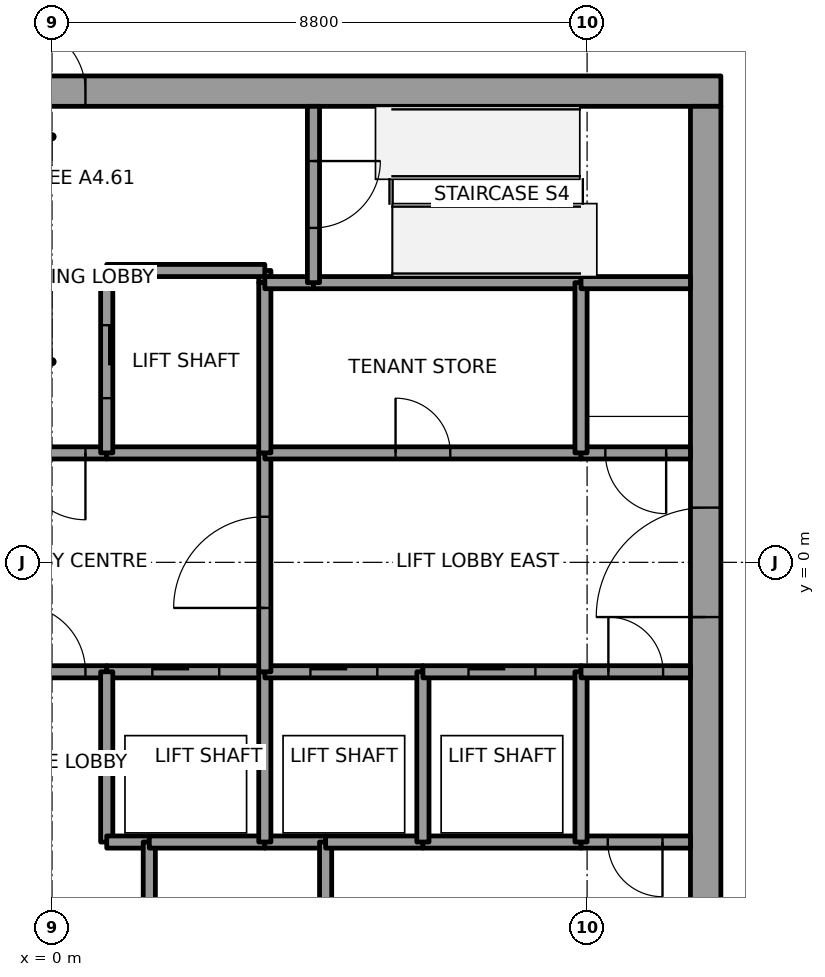
"""IFC4 building model, lengths in metres.
Left out: names, types, materials, properties, quantities, classifications, styles, units other than length and angle.
Written with IfcOpenShell. Run it as: python <this file> out.ifc"""

import sys

from ifc_helpers import new_model, si_unit, direction, frame, frame_2d, origin, place, context, subcontext, project, spatial, rectangle, extrude, element, fill, save


model = new_model("IFC4")
c1 = context("Model", 3, precision=1e-05, world=origin(), true_north=direction((0.0, 1.0)))
c2 = subcontext(c1, "Body", "Model", "MODEL_VIEW")
j1 = project(units=[si_unit("LENGTHUNIT", "METRE"), si_unit("PLANEANGLEUNIT", "RADIAN")], contexts=[c1])
p1 = place(None, origin())
s1 = spatial("IfcSite", under=j1, at=p1, CompositionType="ELEMENT")
p2 = place(p1, origin())
s2 = spatial("IfcBuilding", under=s1, at=p2, CompositionType="ELEMENT")
p3 = place(p2, frame((0.0, 0.0, 263.0)))
s3 = spatial("IfcBuildingStorey", under=s2, at=p3, CompositionType="ELEMENT", Elevation=263.0)
p4 = place(p3, frame((-11.0, 7.75, 0.0), z_axis=(0.0, 0.0, 1.0), x_axis=(1.0, 0.0, 0.0)))
e1 = element("IfcWall", 1, at=p4, inside=s3, PredefinedType="SHEAR", context=c2, shape_type="SweptSolid", body=[
    extrude(rectangle(XDim=22.0, YDim=0.5, at=frame_2d((11.0, 0.0))), origin(), (0.0, 0.0, 1.0), 4.0),
])
p5 = place(p4, frame((10.45, 0.0, 0.0)))
e2 = element("IfcOpeningElement", 2, at=p5, cuts=e1, PredefinedType="OPENING", context=c2, shape_type="SweptSolid", body=[
    extrude(rectangle(XDim=1.1, YDim=2.1, at=frame_2d((0.55, 1.05))), frame((0.0, 0.25, 0.0), z_axis=(0.0, -1.0, 0.0), x_axis=(1.0, 0.0, 0.0)), (0.0, 0.0, 1.0), 0.5),
])
p6 = place(p3, frame((10.75, -7.5, 0.0), z_axis=(0.0, 0.0, 1.0), x_axis=(0.0, 1.0, 0.0)))
e3 = element("IfcWall", 3, at=p6, inside=s3, PredefinedType="SHEAR", context=c2, shape_type="SweptSolid", body=[
    extrude(rectangle(XDim=15.0, YDim=0.5, at=frame_2d((7.5, 0.0))), origin(), (0.0, 0.0, 1.0), 4.0),
])
p7 = place(p6, frame((6.6, 0.0, 0.0)))
e4 = element("IfcOpeningElement", 4, at=p7, cuts=e3, PredefinedType="OPENING", context=c2, shape_type="SweptSolid", body=[
    extrude(rectangle(XDim=1.8, YDim=2.1, at=frame_2d((0.9, 1.05))), frame((0.0, 0.25, 0.0), z_axis=(0.0, -1.0, 0.0), x_axis=(1.0, 0.0, 0.0)), (0.0, 0.0, 1.0), 0.5),
])
p8 = place(p3, frame((-0.9, -1.8, 0.0), z_axis=(0.0, 0.0, 1.0), x_axis=(1.0, 0.0, 0.0)))
e5 = element("IfcWall", 5, at=p8, inside=s3, PredefinedType="SOLIDWALL", context=c2, shape_type="SweptSolid", body=[
    extrude(rectangle(XDim=1.8, YDim=0.2, at=frame_2d((0.9, 0.0))), origin(), (0.0, 0.0, 1.0), 3.85),
])
p9 = place(p8, frame((0.35, 0.0, 0.0)))
e6 = element("IfcOpeningElement", 6, at=p9, cuts=e5, PredefinedType="OPENING", context=c2, shape_type="SweptSolid", body=[
    extrude(rectangle(XDim=1.1, YDim=2.1, at=frame_2d((0.55, 1.05))), frame((0.0, 0.1, 0.0), z_axis=(0.0, -1.0, 0.0), x_axis=(1.0, 0.0, 0.0)), (0.0, 0.0, 1.0), 0.2),
])
p10 = place(p3, frame((0.9, 1.8, 0.0), z_axis=(0.0, 0.0, 1.0), x_axis=(-1.0, 0.0, 0.0)))
e7 = element("IfcWall", 7, at=p10, inside=s3, PredefinedType="SOLIDWALL", context=c2, shape_type="SweptSolid", body=[
    extrude(rectangle(XDim=1.8, YDim=0.2, at=frame_2d((0.9, 0.0))), origin(), (0.0, 0.0, 1.0), 3.85),
])
p11 = place(p10, frame((0.35, 0.0, 0.0)))
e8 = element("IfcOpeningElement", 8, at=p11, cuts=e7, PredefinedType="OPENING", context=c2, shape_type="SweptSolid", body=[
    extrude(rectangle(XDim=1.1, YDim=2.1, at=frame_2d((0.55, 1.05))), frame((0.0, 0.1, 0.0), z_axis=(0.0, -1.0, 0.0), x_axis=(1.0, 0.0, 0.0)), (0.0, 0.0, 1.0), 0.2),
])
p12 = place(p3, frame((0.9, -1.8, 0.0), z_axis=(0.0, 0.0, 1.0), x_axis=(1.0, 0.0, 0.0)))
e9 = element("IfcWall", 9, at=p12, inside=s3, PredefinedType="SOLIDWALL", context=c2, shape_type="SweptSolid", body=[
    extrude(rectangle(XDim=2.6, YDim=0.2, at=frame_2d((1.3, 0.0))), origin(), (0.0, 0.0, 1.0), 3.85),
])
p13 = place(p12, frame((0.75, 0.0, 0.0)))
e10 = element("IfcOpeningElement", 10, at=p13, cuts=e9, PredefinedType="OPENING", context=c2, shape_type="SweptSolid", body=[
    extrude(rectangle(XDim=1.1, YDim=2.1, at=frame_2d((0.55, 1.05))), frame((0.0, 0.1, 0.0), z_axis=(0.0, -1.0, 0.0), x_axis=(1.0, 0.0, 0.0)), (0.0, 0.0, 1.0), 0.2),
])
p14 = place(p3, frame((0.9, -1.8, 0.0), z_axis=(0.0, 0.0, 1.0), x_axis=(0.0, -1.0, 0.0)))
e11 = element("IfcWall", 11, at=p14, inside=s3, PredefinedType="SOLIDWALL", context=c2, shape_type="SweptSolid", body=[
    extrude(rectangle(XDim=2.8, YDim=0.2, at=frame_2d((1.4, 0.0))), origin(), (0.0, 0.0, 1.0), 3.85),
])
p15 = place(p3, frame((0.9, -4.6, 0.0), z_axis=(0.0, 0.0, 1.0), x_axis=(1.0, 0.0, 0.0)))
e12 = element("IfcWall", 12, at=p15, inside=s3, PredefinedType="SOLIDWALL", context=c2, shape_type="SweptSolid", body=[
    extrude(rectangle(XDim=0.7, YDim=0.2, at=frame_2d((0.35, 0.0))), origin(), (0.0, 0.0, 1.0), 3.85),
])
p16 = place(p3, frame((3.5, 1.8, 0.0), z_axis=(0.0, 0.0, 1.0), x_axis=(-1.0, 0.0, 0.0)))
e13 = element("IfcWall", 13, at=p16, inside=s3, PredefinedType="SOLIDWALL", context=c2, shape_type="SweptSolid", body=[
    extrude(rectangle(XDim=2.6, YDim=0.2, at=frame_2d((1.3, 0.0))), origin(), (0.0, 0.0, 1.0), 3.85),
])
p17 = place(p3, frame((3.5, 4.6, 0.0), z_axis=(0.0, 0.0, 1.0), x_axis=(0.0, 1.0, 0.0)))
e14 = element("IfcWall", 14, at=p17, inside=s3, PredefinedType="SOLIDWALL", context=c2, shape_type="SweptSolid", body=[
    extrude(rectangle(XDim=0.2, YDim=0.2, at=frame_2d((0.1, 0.0))), origin(), (0.0, 0.0, 1.0), 3.85),
])
p18 = place(p3, frame((3.5, 4.8, 0.0), z_axis=(0.0, 0.0, 1.0), x_axis=(-1.0, 0.0, 0.0)))
e15 = element("IfcWall", 15, at=p18, inside=s3, PredefinedType="SOLIDWALL", context=c2, shape_type="SweptSolid", body=[
    extrude(rectangle(XDim=2.6, YDim=0.2, at=frame_2d((1.3, 0.0))), origin(), (0.0, 0.0, 1.0), 3.85),
])
p19 = place(p3, frame((0.9, 4.8, 0.0), z_axis=(0.0, 0.0, 1.0), x_axis=(0.0, -1.0, 0.0)))
e16 = element("IfcWall", 16, at=p19, inside=s3, PredefinedType="SOLIDWALL", context=c2, shape_type="SweptSolid", body=[
    extrude(rectangle(XDim=3.0, YDim=0.2, at=frame_2d((1.5, 0.0))), origin(), (0.0, 0.0, 1.0), 3.85),
])
p20 = place(p19, frame((0.9, 0.0, 0.0)))
e17 = element("IfcOpeningElement", 17, at=p20, cuts=e16, PredefinedType="OPENING", context=c2, shape_type="SweptSolid", body=[
    extrude(rectangle(XDim=1.2, YDim=2.1, at=frame_2d((0.6, 1.05))), frame((0.0, 0.1, 0.0), z_axis=(0.0, -1.0, 0.0), x_axis=(1.0, 0.0, 0.0)), (0.0, 0.0, 1.0), 0.2),
])
p21 = place(p3, frame((1.6, -4.6, 0.0), z_axis=(0.0, 0.0, 1.0), x_axis=(0.0, -1.0, 0.0)))
e18 = element("IfcWall", 18, at=p21, inside=s3, PredefinedType="SOLIDWALL", context=c2, shape_type="SweptSolid", body=[
    extrude(rectangle(XDim=2.9, YDim=0.2, at=frame_2d((1.45, 0.0))), origin(), (0.0, 0.0, 1.0), 3.85),
])
p22 = place(p21, frame((1.0, 0.0, 0.0)))
e19 = element("IfcOpeningElement", 19, at=p22, cuts=e18, PredefinedType="OPENING", context=c2, shape_type="SweptSolid", body=[
    extrude(rectangle(XDim=0.9, YDim=2.1, at=frame_2d((0.45, 1.05))), frame((0.0, 0.1, 0.0), z_axis=(0.0, -1.0, 0.0), x_axis=(1.0, 0.0, 0.0)), (0.0, 0.0, 1.0), 0.2),
])
p23 = place(p3, frame((3.5, -4.6, 0.0), z_axis=(0.0, 0.0, 1.0), x_axis=(-1.0, 0.0, 0.0)))
e20 = element("IfcWall", 20, at=p23, inside=s3, PredefinedType="SOLIDWALL", context=c2, shape_type="SweptSolid", body=[
    extrude(rectangle(XDim=1.9, YDim=0.2, at=frame_2d((0.95, 0.0))), origin(), (0.0, 0.0, 1.0), 3.85),
])
p24 = place(p3, frame((4.5, -4.6, 0.0), z_axis=(0.0, 0.0, 1.0), x_axis=(-1.0, 0.0, 0.0)))
e21 = element("IfcWall", 21, at=p24, inside=s3, PredefinedType="SOLIDWALL", context=c2, shape_type="SweptSolid", body=[
    extrude(rectangle(XDim=1.0, YDim=0.2, at=frame_2d((0.5, 0.0))), origin(), (0.0, 0.0, 1.0), 3.85),
])
p25 = place(p3, frame((3.5, -4.6, 0.0), z_axis=(0.0, 0.0, 1.0), x_axis=(0.0, 1.0, 0.0)))
e22 = element("IfcWall", 22, at=p25, inside=s3, PredefinedType="SOLIDWALL", context=c2, shape_type="SweptSolid", body=[
    extrude(rectangle(XDim=2.8, YDim=0.2, at=frame_2d((1.4, 0.0))), origin(), (0.0, 0.0, 1.0), 3.85),
])
p26 = place(p3, frame((3.5, -1.8, 0.0), z_axis=(0.0, 0.0, 1.0), x_axis=(1.0, 0.0, 0.0)))
e23 = element("IfcWall", 23, at=p26, inside=s3, PredefinedType="SOLIDWALL", context=c2, shape_type="SweptSolid", body=[
    extrude(rectangle(XDim=2.6, YDim=0.2, at=frame_2d((1.3, 0.0))), origin(), (0.0, 0.0, 1.0), 3.85),
])
p27 = place(p26, frame((0.75, 0.0, 0.0)))
e24 = element("IfcOpeningElement", 24, at=p27, cuts=e23, PredefinedType="OPENING", context=c2, shape_type="SweptSolid", body=[
    extrude(rectangle(XDim=1.1, YDim=2.1, at=frame_2d((0.55, 1.05))), frame((0.0, 0.1, 0.0), z_axis=(0.0, -1.0, 0.0), x_axis=(1.0, 0.0, 0.0)), (0.0, 0.0, 1.0), 0.2),
])
p28 = place(p3, frame((3.5, -1.8, 0.0), z_axis=(0.0, 0.0, 1.0), x_axis=(0.0, 1.0, 0.0)))
e25 = element("IfcWall", 25, at=p28, inside=s3, PredefinedType="SOLIDWALL", context=c2, shape_type="SweptSolid", body=[
    extrude(rectangle(XDim=3.6, YDim=0.2, at=frame_2d((1.8, 0.0))), origin(), (0.0, 0.0, 1.0), 3.85),
])
p29 = place(p28, frame((1.05, 0.0, 0.0)))
e26 = element("IfcOpeningElement", 26, at=p29, cuts=e25, PredefinedType="OPENING", context=c2, shape_type="SweptSolid", body=[
    extrude(rectangle(XDim=1.5, YDim=2.1, at=frame_2d((0.75, 1.05))), frame((0.0, 0.1, 0.0), z_axis=(0.0, -1.0, 0.0), x_axis=(1.0, 0.0, 0.0)), (0.0, 0.0, 1.0), 0.2),
])
p30 = place(p3, frame((3.5, 1.8, 0.0), z_axis=(0.0, 0.0, 1.0), x_axis=(1.0, 0.0, 0.0)))
e27 = element("IfcWall", 27, at=p30, inside=s3, PredefinedType="SOLIDWALL", context=c2, shape_type="SweptSolid", body=[
    extrude(rectangle(XDim=5.2, YDim=0.2, at=frame_2d((2.6, 0.0))), origin(), (0.0, 0.0, 1.0), 3.85),
])
p31 = place(p30, frame((2.15, 0.0, 0.0)))
e28 = element("IfcOpeningElement", 28, at=p31, cuts=e27, PredefinedType="OPENING", context=c2, shape_type="SweptSolid", body=[
    extrude(rectangle(XDim=0.9, YDim=2.1, at=frame_2d((0.45, 1.05))), frame((0.0, 0.1, 0.0), z_axis=(0.0, -1.0, 0.0), x_axis=(1.0, 0.0, 0.0)), (0.0, 0.0, 1.0), 0.2),
])
p32 = place(p3, frame((3.5, 4.6, 0.0), z_axis=(0.0, 0.0, 1.0), x_axis=(0.0, -1.0, 0.0)))
e29 = element("IfcWall", 29, at=p32, inside=s3, PredefinedType="SOLIDWALL", context=c2, shape_type="SweptSolid", body=[
    extrude(rectangle(XDim=2.8, YDim=0.2, at=frame_2d((1.4, 0.0))), origin(), (0.0, 0.0, 1.0), 3.85),
])
p33 = place(p3, frame((4.3, 4.6, 0.0), z_axis=(0.0, 0.0, 1.0), x_axis=(-1.0, 0.0, 0.0)))
e30 = element("IfcWall", 30, at=p33, inside=s3, PredefinedType="SOLIDWALL", context=c2, shape_type="SweptSolid", body=[
    extrude(rectangle(XDim=0.8, YDim=0.2, at=frame_2d((0.4, 0.0))), origin(), (0.0, 0.0, 1.0), 3.85),
])
p34 = place(p3, frame((8.7, 4.6, 0.0), z_axis=(0.0, 0.0, 1.0), x_axis=(-1.0, 0.0, 0.0)))
e31 = element("IfcWall", 31, at=p34, inside=s3, PredefinedType="SOLIDWALL", context=c2, shape_type="SweptSolid", body=[
    extrude(rectangle(XDim=4.4, YDim=0.2, at=frame_2d((2.2, 0.0))), origin(), (0.0, 0.0, 1.0), 3.85),
])
p35 = place(p3, frame((4.3, 7.5, 0.0), z_axis=(0.0, 0.0, 1.0), x_axis=(0.0, -1.0, 0.0)))
e32 = element("IfcWall", 32, at=p35, inside=s3, PredefinedType="SOLIDWALL", context=c2, shape_type="SweptSolid", body=[
    extrude(rectangle(XDim=2.9, YDim=0.2, at=frame_2d((1.45, 0.0))), origin(), (0.0, 0.0, 1.0), 3.85),
])
p36 = place(p35, frame((0.9, 0.0, 0.0)))
e33 = element("IfcOpeningElement", 33, at=p36, cuts=e32, PredefinedType="OPENING", context=c2, shape_type="SweptSolid", body=[
    extrude(rectangle(XDim=1.1, YDim=2.1, at=frame_2d((0.55, 1.05))), frame((0.0, 0.1, 0.0), z_axis=(0.0, -1.0, 0.0), x_axis=(1.0, 0.0, 0.0)), (0.0, 0.0, 1.0), 0.2),
])
p37 = place(p3, frame((4.5, -4.6, 0.0), z_axis=(0.0, 0.0, 1.0), x_axis=(0.0, -1.0, 0.0)))
e34 = element("IfcWall", 34, at=p37, inside=s3, PredefinedType="SOLIDWALL", context=c2, shape_type="SweptSolid", body=[
    extrude(rectangle(XDim=2.9, YDim=0.2, at=frame_2d((1.45, 0.0))), origin(), (0.0, 0.0, 1.0), 3.85),
])
p38 = place(p3, frame((6.1, -4.6, 0.0), z_axis=(0.0, 0.0, 1.0), x_axis=(-1.0, 0.0, 0.0)))
e35 = element("IfcWall", 35, at=p38, inside=s3, PredefinedType="SOLIDWALL", context=c2, shape_type="SweptSolid", body=[
    extrude(rectangle(XDim=1.6, YDim=0.2, at=frame_2d((0.8, 0.0))), origin(), (0.0, 0.0, 1.0), 3.85),
])
p39 = place(p3, frame((8.7, -4.6, 0.0), z_axis=(0.0, 0.0, 1.0), x_axis=(-1.0, 0.0, 0.0)))
e36 = element("IfcWall", 36, at=p39, inside=s3, PredefinedType="SOLIDWALL", context=c2, shape_type="SweptSolid", body=[
    extrude(rectangle(XDim=2.6, YDim=0.2, at=frame_2d((1.3, 0.0))), origin(), (0.0, 0.0, 1.0), 3.85),
])
p40 = place(p3, frame((6.1, -4.6, 0.0), z_axis=(0.0, 0.0, 1.0), x_axis=(0.0, 1.0, 0.0)))
e37 = element("IfcWall", 37, at=p40, inside=s3, PredefinedType="SOLIDWALL", context=c2, shape_type="SweptSolid", body=[
    extrude(rectangle(XDim=2.8, YDim=0.2, at=frame_2d((1.4, 0.0))), origin(), (0.0, 0.0, 1.0), 3.85),
])
p41 = place(p3, frame((6.1, -1.8, 0.0), z_axis=(0.0, 0.0, 1.0), x_axis=(1.0, 0.0, 0.0)))
e38 = element("IfcWall", 38, at=p41, inside=s3, PredefinedType="SOLIDWALL", context=c2, shape_type="SweptSolid", body=[
    extrude(rectangle(XDim=2.6, YDim=0.2, at=frame_2d((1.3, 0.0))), origin(), (0.0, 0.0, 1.0), 3.85),
])
p42 = place(p41, frame((0.75, 0.0, 0.0)))
e39 = element("IfcOpeningElement", 39, at=p42, cuts=e38, PredefinedType="OPENING", context=c2, shape_type="SweptSolid", body=[
    extrude(rectangle(XDim=1.1, YDim=2.1, at=frame_2d((0.55, 1.05))), frame((0.0, 0.1, 0.0), z_axis=(0.0, -1.0, 0.0), x_axis=(1.0, 0.0, 0.0)), (0.0, 0.0, 1.0), 0.2),
])
p43 = place(p3, frame((10.5, -4.6, 0.0), z_axis=(0.0, 0.0, 1.0), x_axis=(-1.0, 0.0, 0.0)))
e40 = element("IfcWall", 40, at=p43, inside=s3, PredefinedType="SOLIDWALL", context=c2, shape_type="SweptSolid", body=[
    extrude(rectangle(XDim=1.8, YDim=0.2, at=frame_2d((0.9, 0.0))), origin(), (0.0, 0.0, 1.0), 3.85),
])
p44 = place(p43, frame((0.46, 0.0, 0.0)))
e41 = element("IfcOpeningElement", 41, at=p44, cuts=e40, PredefinedType="OPENING", context=c2, shape_type="SweptSolid", body=[
    extrude(rectangle(XDim=0.9, YDim=2.1, at=frame_2d((0.45, 1.05))), frame((0.0, 0.1, 0.0), z_axis=(0.0, -1.0, 0.0), x_axis=(1.0, 0.0, 0.0)), (0.0, 0.0, 1.0), 0.2),
])
p45 = place(p3, frame((8.7, -1.8, 0.0), z_axis=(0.0, 0.0, 1.0), x_axis=(0.0, -1.0, 0.0)))
e42 = element("IfcWall", 42, at=p45, inside=s3, PredefinedType="SOLIDWALL", context=c2, shape_type="SweptSolid", body=[
    extrude(rectangle(XDim=2.8, YDim=0.2, at=frame_2d((1.4, 0.0))), origin(), (0.0, 0.0, 1.0), 3.85),
])
p46 = place(p3, frame((8.7, -1.8, 0.0), z_axis=(0.0, 0.0, 1.0), x_axis=(1.0, 0.0, 0.0)))
e43 = element("IfcWall", 43, at=p46, inside=s3, PredefinedType="SOLIDWALL", context=c2, shape_type="SweptSolid", body=[
    extrude(rectangle(XDim=1.8, YDim=0.2, at=frame_2d((0.9, 0.0))), origin(), (0.0, 0.0, 1.0), 3.85),
])
p47 = place(p46, frame((0.45, 0.0, 0.0)))
e44 = element("IfcOpeningElement", 44, at=p47, cuts=e43, PredefinedType="OPENING", context=c2, shape_type="SweptSolid", body=[
    extrude(rectangle(XDim=0.9, YDim=2.1, at=frame_2d((0.45, 1.05))), frame((0.0, 0.1, 0.0), z_axis=(0.0, -1.0, 0.0), x_axis=(1.0, 0.0, 0.0)), (0.0, 0.0, 1.0), 0.2),
])
p48 = place(p3, frame((10.5, 1.8, 0.0), z_axis=(0.0, 0.0, 1.0), x_axis=(-1.0, 0.0, 0.0)))
e45 = element("IfcWall", 45, at=p48, inside=s3, PredefinedType="SOLIDWALL", context=c2, shape_type="SweptSolid", body=[
    extrude(rectangle(XDim=1.8, YDim=0.2, at=frame_2d((0.9, 0.0))), origin(), (0.0, 0.0, 1.0), 3.85),
])
p49 = place(p48, frame((0.4, 0.0, 0.0)))
e46 = element("IfcOpeningElement", 46, at=p49, cuts=e45, PredefinedType="OPENING", context=c2, shape_type="SweptSolid", body=[
    extrude(rectangle(XDim=1.0, YDim=2.1, at=frame_2d((0.5, 1.05))), frame((0.0, 0.1, 0.0), z_axis=(0.0, -1.0, 0.0), x_axis=(1.0, 0.0, 0.0)), (0.0, 0.0, 1.0), 0.2),
])
p50 = place(p3, frame((8.7, 1.8, 0.0), z_axis=(0.0, 0.0, 1.0), x_axis=(0.0, 1.0, 0.0)))
e47 = element("IfcWall", 47, at=p50, inside=s3, PredefinedType="SOLIDWALL", context=c2, shape_type="SweptSolid", body=[
    extrude(rectangle(XDim=2.8, YDim=0.2, at=frame_2d((1.4, 0.0))), origin(), (0.0, 0.0, 1.0), 3.85),
])
p51 = place(p3, frame((10.5, 4.6, 0.0), z_axis=(0.0, 0.0, 1.0), x_axis=(-1.0, 0.0, 0.0)))
e48 = element("IfcWall", 48, at=p51, inside=s3, PredefinedType="SOLIDWALL", context=c2, shape_type="SweptSolid", body=[
    extrude(rectangle(XDim=1.8, YDim=0.2, at=frame_2d((0.9, 0.0))), origin(), (0.0, 0.0, 1.0), 3.85),
])
p52 = place(p13, origin())
e49 = element("IfcDoor", 49, at=p52, inside=s3, OperationType="SLIDING_TO_LEFT", PredefinedType="DOOR", context=c2, shape_type="SweptSolid", body=[
    extrude(rectangle(XDim=1.1, YDim=2.1, at=frame_2d((0.55, 1.05))), frame((0.0, 0.025, 0.0), z_axis=(0.0, -1.0, 0.0), x_axis=(1.0, 0.0, 0.0)), (0.0, 0.0, 1.0), 0.05),
])
fill(e10, e49)
p53 = place(p27, origin())
e50 = element("IfcDoor", 50, at=p53, inside=s3, OperationType="SLIDING_TO_RIGHT", PredefinedType="DOOR", context=c2, shape_type="SweptSolid", body=[
    extrude(rectangle(XDim=1.1, YDim=2.1, at=frame_2d((0.55, 1.05))), frame((0.0, 0.025, 0.0), z_axis=(0.0, -1.0, 0.0), x_axis=(1.0, 0.0, 0.0)), (0.0, 0.0, 1.0), 0.05),
])
fill(e24, e50)
p54 = place(p42, origin())
e51 = element("IfcDoor", 51, at=p54, inside=s3, OperationType="SLIDING_TO_RIGHT", PredefinedType="DOOR", context=c2, shape_type="SweptSolid", body=[
    extrude(rectangle(XDim=1.1, YDim=2.1, at=frame_2d((0.55, 1.05))), frame((0.0, 0.025, 0.0), z_axis=(0.0, -1.0, 0.0), x_axis=(1.0, 0.0, 0.0)), (0.0, 0.0, 1.0), 0.05),
])
fill(e39, e51)
p55 = place(p20, origin())
e52 = element("IfcDoor", 52, at=p55, inside=s3, OperationType="SLIDING_TO_LEFT", PredefinedType="DOOR", context=c2, shape_type="SweptSolid", body=[
    extrude(rectangle(XDim=1.2, YDim=2.1, at=frame_2d((0.6, 1.05))), frame((0.0, 0.025, 0.0), z_axis=(0.0, -1.0, 0.0), x_axis=(1.0, 0.0, 0.0)), (0.0, 0.0, 1.0), 0.05),
])
fill(e17, e52)
p56 = place(p29, origin())
e53 = element("IfcDoor", 53, at=p56, inside=s3, OperationType="DOUBLE_DOOR_SINGLE_SWING", PredefinedType="DOOR", context=c2, shape_type="SweptSolid", body=[
    extrude(rectangle(XDim=1.5, YDim=2.1, at=frame_2d((0.75, 1.05))), frame((0.0, 0.025, 0.0), z_axis=(0.0, -1.0, 0.0), x_axis=(1.0, 0.0, 0.0)), (0.0, 0.0, 1.0), 0.05),
])
fill(e26, e53)
p57 = place(p11, origin())
e54 = element("IfcDoor", 54, at=p57, inside=s3, OperationType="SINGLE_SWING_RIGHT", PredefinedType="DOOR", context=c2, shape_type="SweptSolid", body=[
    extrude(rectangle(XDim=1.1, YDim=2.1, at=frame_2d((0.55, 1.05))), frame((0.0, 0.025, 0.0), z_axis=(0.0, -1.0, 0.0), x_axis=(1.0, 0.0, 0.0)), (0.0, 0.0, 1.0), 0.05),
])
fill(e8, e54)
p58 = place(p9, origin())
e55 = element("IfcDoor", 55, at=p58, inside=s3, OperationType="SINGLE_SWING_RIGHT", PredefinedType="DOOR", context=c2, shape_type="SweptSolid", body=[
    extrude(rectangle(XDim=1.1, YDim=2.1, at=frame_2d((0.55, 1.05))), frame((0.0, 0.025, 0.0), z_axis=(0.0, -1.0, 0.0), x_axis=(1.0, 0.0, 0.0)), (0.0, 0.0, 1.0), 0.05),
])
fill(e6, e55)
p59 = place(p49, origin())
e56 = element("IfcDoor", 56, at=p59, inside=s3, OperationType="SINGLE_SWING_RIGHT", PredefinedType="DOOR", context=c2, shape_type="SweptSolid", body=[
    extrude(rectangle(XDim=1.0, YDim=2.1, at=frame_2d((0.5, 1.05))), frame((0.0, 0.025, 0.0), z_axis=(0.0, -1.0, 0.0), x_axis=(1.0, 0.0, 0.0)), (0.0, 0.0, 1.0), 0.05),
])
fill(e46, e56)
p60 = place(p36, origin())
e57 = element("IfcDoor", 57, at=p60, inside=s3, OperationType="SINGLE_SWING_LEFT", PredefinedType="DOOR", context=c2, shape_type="SweptSolid", body=[
    extrude(rectangle(XDim=1.1, YDim=2.1, at=frame_2d((0.55, 1.05))), frame((0.0, 0.025, 0.0), z_axis=(0.0, -1.0, 0.0), x_axis=(1.0, 0.0, 0.0)), (0.0, 0.0, 1.0), 0.05),
])
fill(e33, e57)
p61 = place(p31, origin())
e58 = element("IfcDoor", 58, at=p61, inside=s3, OperationType="SINGLE_SWING_LEFT", PredefinedType="DOOR", context=c2, shape_type="SweptSolid", body=[
    extrude(rectangle(XDim=0.9, YDim=2.1, at=frame_2d((0.45, 1.05))), frame((0.0, 0.025, 0.0), z_axis=(0.0, -1.0, 0.0), x_axis=(1.0, 0.0, 0.0)), (0.0, 0.0, 1.0), 0.05),
])
fill(e28, e58)
p62 = place(p44, origin())
e59 = element("IfcDoor", 59, at=p62, inside=s3, OperationType="SINGLE_SWING_RIGHT", PredefinedType="DOOR", context=c2, shape_type="SweptSolid", body=[
    extrude(rectangle(XDim=0.9, YDim=2.1, at=frame_2d((0.45, 1.05))), frame((0.0, 0.025, 0.0), z_axis=(0.0, -1.0, 0.0), x_axis=(1.0, 0.0, 0.0)), (0.0, 0.0, 1.0), 0.05),
])
fill(e41, e59)
p63 = place(p47, origin())
e60 = element("IfcDoor", 60, at=p63, inside=s3, OperationType="SINGLE_SWING_RIGHT", PredefinedType="DOOR", context=c2, shape_type="SweptSolid", body=[
    extrude(rectangle(XDim=0.9, YDim=2.1, at=frame_2d((0.45, 1.05))), frame((0.0, 0.025, 0.0), z_axis=(0.0, -1.0, 0.0), x_axis=(1.0, 0.0, 0.0)), (0.0, 0.0, 1.0), 0.05),
])
fill(e44, e60)
p64 = place(p7, origin())
e61 = element("IfcDoor", 61, at=p64, inside=s3, OperationType="DOUBLE_DOOR_SINGLE_SWING", PredefinedType="DOOR", context=c2, shape_type="SweptSolid", body=[
    extrude(rectangle(XDim=1.8, YDim=2.1, at=frame_2d((0.9, 1.05))), frame((0.0, 0.025, 0.0), z_axis=(0.0, -1.0, 0.0), x_axis=(1.0, 0.0, 0.0)), (0.0, 0.0, 1.0), 0.05),
])
fill(e4, e61)
p65 = place(p5, origin())
e62 = element("IfcDoor", 62, at=p65, inside=s3, OperationType="SINGLE_SWING_LEFT", PredefinedType="DOOR", context=c2, shape_type="SweptSolid", body=[
    extrude(rectangle(XDim=1.1, YDim=2.1, at=frame_2d((0.55, 1.05))), frame((0.0, 0.025, 0.0), z_axis=(0.0, -1.0, 0.0), x_axis=(1.0, 0.0, 0.0)), (0.0, 0.0, 1.0), 0.05),
])
fill(e2, e62)
save(model, sys.argv[1])
